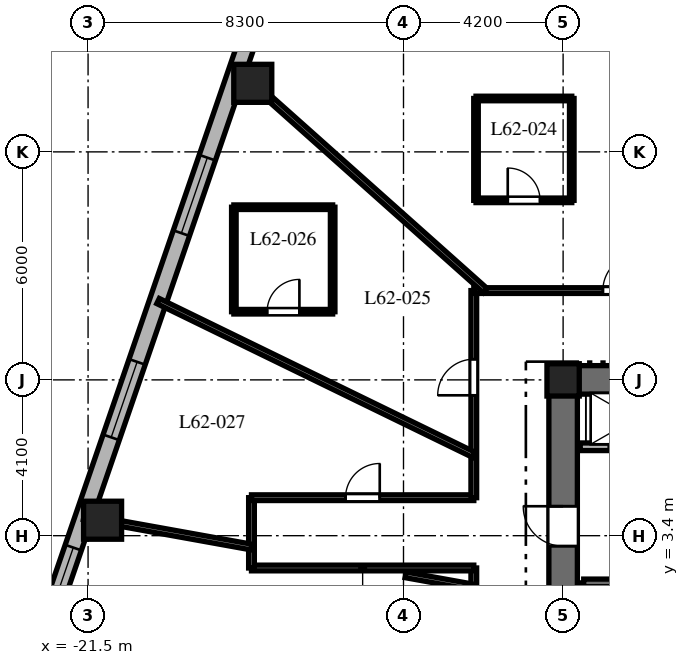
"""IFC4 building model, lengths in metres.
Left out: names, types, materials, properties, quantities, classifications, styles, units other than length and angle.
Written with IfcOpenShell. Run it as: python <this file> out.ifc"""

import sys

from ifc_helpers import new_model, si_unit, direction, frame, frame_2d, origin, origin_2d, place, context, subcontext, project, spatial, rectangle, extrude, element, fill, save


model = new_model("IFC4")
c1 = context("Model", 3, precision=1e-05, world=origin(), true_north=direction((0.0, 1.0)))
c2 = subcontext(c1, "Body", "Model", "MODEL_VIEW")
j1 = project(units=[si_unit("LENGTHUNIT", "METRE"), si_unit("PLANEANGLEUNIT", "RADIAN")], contexts=[c1])
p1 = place(None, origin())
s1 = spatial("IfcSite", under=j1, at=p1, CompositionType="ELEMENT")
p2 = place(p1, origin())
s2 = spatial("IfcBuilding", under=s1, at=p2, CompositionType="ELEMENT")
p3 = place(p2, frame((0.0, 0.0, 248.3)))
s3 = spatial("IfcBuildingStorey", under=s2, at=p3, CompositionType="ELEMENT", Elevation=248.3)
p4 = place(p3, frame((-9.375, 7.5, 0.0), z_axis=(0.0, 0.0, 1.0), x_axis=(1.0, 0.0, 0.0)))
e1 = element("IfcWall", 1, at=p4, inside=s3, PredefinedType="SHEAR", context=c2, shape_type="SweptSolid", body=[
    extrude(rectangle(XDim=9.425, YDim=0.75, at=frame_2d((4.712, 0.0))), origin(), (0.0, 0.0, 1.0), 3.8),
])
p5 = place(p3, frame((-9.0, -7.125, 0.0), z_axis=(0.0, 0.0, 1.0), x_axis=(0.0, 1.0, 0.0)))
e2 = element("IfcWall", 2, at=p5, inside=s3, PredefinedType="SHEAR", context=c2, shape_type="SweptSolid", body=[
    extrude(rectangle(XDim=14.25, YDim=0.75, at=frame_2d((7.125, 0.0))), origin(), (0.0, 0.0, 1.0), 3.8),
])
p6 = place(p5, frame((10.25, 0.0, 0.0)))
e3 = element("IfcOpeningElement", 3, at=p6, cuts=e2, PredefinedType="OPENING", context=c2, shape_type="SweptSolid", body=[
    extrude(rectangle(XDim=1.05, YDim=2.15, at=frame_2d((0.525, 1.075))), frame((0.0, 0.385, 0.0), z_axis=(0.0, -1.0, 0.0), x_axis=(1.0, 0.0, 0.0)), (0.0, 0.0, 1.0), 0.77),
])
p7 = place(p3, frame((-8.458, -6.985, 0.0), z_axis=(0.0, 0.0, 1.0), x_axis=(0.0, 1.0, 0.0)))
e4 = element("IfcWall", 4, at=p7, inside=s3, PredefinedType="SHEAR", context=c2, shape_type="SweptSolid", body=[
    extrude(rectangle(XDim=9.143, YDim=0.2, at=frame_2d((4.572, 0.0))), origin(), (0.0, 0.0, 1.0), 3.8),
])
p8 = place(p3, frame((-8.458, 2.158, 0.0), z_axis=(0.0, 0.0, 1.0), x_axis=(1.0, 0.0, 0.0)))
e5 = element("IfcWall", 5, at=p8, inside=s3, PredefinedType="SHEAR", context=c2, shape_type="SweptSolid", body=[
    extrude(rectangle(XDim=3.686, YDim=0.2, at=frame_2d((1.843, 0.0))), origin(), (0.0, 0.0, 1.0), 3.8),
])
p9 = place(p8, frame((1.3, 0.0, 0.0)))
e6 = element("IfcOpeningElement", 6, at=p9, cuts=e5, PredefinedType="OPENING", context=c2, shape_type="SweptSolid", body=[
    extrude(rectangle(XDim=1.0, YDim=2.15, at=frame_2d((0.5, 1.075))), frame((0.0, 0.11, 0.0), z_axis=(0.0, -1.0, 0.0), x_axis=(1.0, 0.0, 0.0)), (0.0, 0.0, 1.0), 0.22),
])
p10 = place(p3, frame((-9.0, 7.5, 0.0), z_axis=(0.0, 0.0, 1.0), x_axis=(1.0, 0.0, 0.0)))
e7 = element("IfcColumn", 7, at=p10, inside=s3, PredefinedType="COLUMN", context=c2, shape_type="SweptSolid", body=[
    extrude(rectangle(XDim=0.85, YDim=0.85, at=origin_2d()), origin(), (0.0, 0.0, 1.0), 3.8),
])
for number, where, z_axis, x_axis in (
    (8, (-17.166, 15.304, 0.0), (0.0, 0.0, 1.0), (1.0, 0.0, 0.0)),
    (9, (-21.118, 3.807, 0.0), (0.0, 0.0, 1.0), (1.0, 0.0, 0.0)),
):
    element("IfcColumn", number, at=place(p3, frame(where, z_axis=z_axis, x_axis=x_axis)), inside=s3, PredefinedType="COLUMN", context=c2, shape_type="SweptSolid", body=[
        extrude(rectangle(XDim=1.0, YDim=1.0, at=origin_2d()), origin(), (0.0, 0.0, 1.0), 3.8),
    ])
p11 = place(p3, frame((-16.324, 19.275, 0.0), z_axis=(0.0, 0.0, 1.0), x_axis=(-0.325083142304, -0.945685439557, 0.0)))
e10 = element("IfcWall", 10, at=p11, inside=s3, PredefinedType="SOLIDWALL", context=c2, shape_type="SweptSolid", body=[
    extrude(rectangle(XDim=20.224, YDim=0.45, at=frame_2d((10.112, 0.0))), origin(), (0.0, 0.0, 1.0), 3.5),
])
p12 = place(p11, frame((0.953, 0.0, 0.8)))
e11 = element("IfcOpeningElement", 11, at=p12, cuts=e10, PredefinedType="OPENING", context=c2, shape_type="SweptSolid", body=[
    extrude(rectangle(XDim=2.1, YDim=1.85, at=frame_2d((1.05, 0.925))), frame((0.0, 0.235, 0.0), z_axis=(0.0, -1.0, 0.0), x_axis=(1.0, 0.0, 0.0)), (0.0, 0.0, 1.0), 0.47),
])
p13 = place(p11, frame((6.268, 0.0, 0.8)))
e12 = element("IfcOpeningElement", 12, at=p13, cuts=e10, PredefinedType="OPENING", context=c2, shape_type="SweptSolid", body=[
    extrude(rectangle(XDim=2.1, YDim=1.85, at=frame_2d((1.05, 0.925))), frame((0.0, 0.235, 0.0), z_axis=(0.0, -1.0, 0.0), x_axis=(1.0, 0.0, 0.0)), (0.0, 0.0, 1.0), 0.47),
])
p14 = place(p11, frame((11.95, 0.0, 0.8)))
e13 = element("IfcOpeningElement", 13, at=p14, cuts=e10, PredefinedType="OPENING", context=c2, shape_type="SweptSolid", body=[
    extrude(rectangle(XDim=2.1, YDim=1.85, at=frame_2d((1.05, 0.925))), frame((0.0, 0.235, 0.0), z_axis=(0.0, -1.0, 0.0), x_axis=(1.0, 0.0, 0.0)), (0.0, 0.0, 1.0), 0.47),
])
p15 = place(p11, frame((17.118, 0.0, 0.8)))
e14 = element("IfcOpeningElement", 14, at=p15, cuts=e10, PredefinedType="OPENING", context=c2, shape_type="SweptSolid", body=[
    extrude(rectangle(XDim=2.1, YDim=1.85, at=frame_2d((1.05, 0.925))), frame((0.0, 0.235, 0.0), z_axis=(0.0, -1.0, 0.0), x_axis=(1.0, 0.0, 0.0)), (0.0, 0.0, 1.0), 0.47),
])
p16 = place(p3, frame((-8.55, 5.74, 0.0), z_axis=(0.0, 0.0, 1.0), x_axis=(1.0, 0.0, 0.0)))
e15 = element("IfcWall", 15, at=p16, inside=s3, PredefinedType="PARTITIONING", context=c2, shape_type="SweptSolid", body=[
    extrude(rectangle(XDim=4.05, YDim=0.2, at=frame_2d((2.025, 0.0))), origin(), (0.0, 0.0, 1.0), 3.5),
])
p17 = place(p16, frame((0.75, 0.0, 0.0)))
e16 = element("IfcOpeningElement", 16, at=p17, cuts=e15, PredefinedType="OPENING", context=c2, shape_type="SweptSolid", body=[
    extrude(rectangle(XDim=1.1, YDim=2.2, at=frame_2d((0.55, 1.1))), frame((0.0, 0.11, 0.0), z_axis=(0.0, -1.0, 0.0), x_axis=(1.0, 0.0, 0.0)), (0.0, 0.0, 1.0), 0.22),
])
p18 = place(p16, frame((2.9, 0.0, 0.0)))
e17 = element("IfcOpeningElement", 17, at=p18, cuts=e15, PredefinedType="OPENING", context=c2, shape_type="SweptSolid", body=[
    extrude(rectangle(XDim=0.85, YDim=2.03, at=frame_2d((0.425, 1.015))), frame((0.0, 0.11, 0.0), z_axis=(0.0, -1.0, 0.0), x_axis=(1.0, 0.0, 0.0)), (0.0, 0.0, 1.0), 0.22),
])
p19 = place(p3, frame((-11.35, -9.85, 0.0), z_axis=(0.0, 0.0, 1.0), x_axis=(0.0, 1.0, 0.0)))
e18 = element("IfcWall", 18, at=p19, inside=s3, PredefinedType="PARTITIONING", context=c2, shape_type="SweptSolid", body=[
    extrude(rectangle(XDim=12.4, YDim=0.15, at=frame_2d((6.2, 0.0))), origin(), (0.0, 0.0, 1.0), 2.99),
])
p20 = place(p19, frame((8.835, 0.0, 0.0)))
e19 = element("IfcOpeningElement", 19, at=p20, cuts=e18, PredefinedType="OPENING", context=c2, shape_type="SweptSolid", body=[
    extrude(rectangle(XDim=0.95, YDim=2.03, at=frame_2d((0.475, 1.015))), frame((0.0, 0.085, 0.0), z_axis=(0.0, -1.0, 0.0), x_axis=(1.0, 0.0, 0.0)), (0.0, 0.0, 1.0), 0.17),
])
p21 = place(p19, frame((4.709, 0.0, 0.0)))
e20 = element("IfcOpeningElement", 20, at=p21, cuts=e18, PredefinedType="OPENING", context=c2, shape_type="SweptSolid", body=[
    extrude(rectangle(XDim=0.9, YDim=2.03, at=frame_2d((0.45, 1.015))), frame((0.0, 0.085, 0.0), z_axis=(0.0, -1.0, 0.0), x_axis=(1.0, 0.0, 0.0)), (0.0, 0.0, 1.0), 0.17),
])
p22 = place(p19, frame((1.457, 0.0, 0.0)))
e21 = element("IfcOpeningElement", 21, at=p22, cuts=e18, PredefinedType="OPENING", context=c2, shape_type="SweptSolid", body=[
    extrude(rectangle(XDim=0.95, YDim=2.03, at=frame_2d((0.475, 1.015))), frame((0.0, 0.085, 0.0), z_axis=(0.0, -1.0, 0.0), x_axis=(1.0, 0.0, 0.0)), (0.0, 0.0, 1.0), 0.17),
])
p23 = place(p3, frame((-11.35, 2.55, 0.0), z_axis=(0.0, 0.0, 1.0), x_axis=(-1.0, 0.0, 0.0)))
e22 = element("IfcWall", 22, at=p23, inside=s3, PredefinedType="PARTITIONING", context=c2, shape_type="SweptSolid", body=[
    extrude(rectangle(XDim=5.85, YDim=0.15, at=frame_2d((2.925, 0.0))), origin(), (0.0, 0.0, 1.0), 2.94),
])
p24 = place(p3, frame((-17.2, 2.55, 0.0), z_axis=(0.0, 0.0, 1.0), x_axis=(0.0, 1.0, 0.0)))
e23 = element("IfcWall", 23, at=p24, inside=s3, PredefinedType="PARTITIONING", context=c2, shape_type="SweptSolid", body=[
    extrude(rectangle(XDim=1.85, YDim=0.15, at=frame_2d((0.925, 0.0))), origin(), (0.0, 0.0, 1.0), 2.94),
])
p25 = place(p3, frame((-17.2, 4.4, 0.0), z_axis=(0.0, 0.0, 1.0), x_axis=(1.0, 0.0, 0.0)))
e24 = element("IfcWall", 24, at=p25, inside=s3, PredefinedType="PARTITIONING", context=c2, shape_type="SweptSolid", body=[
    extrude(rectangle(XDim=5.85, YDim=0.15, at=frame_2d((2.925, 0.0))), origin(), (0.0, 0.0, 1.0), 2.94),
])
p26 = place(p25, frame((2.475, 0.0, 0.0)))
e25 = element("IfcOpeningElement", 25, at=p26, cuts=e24, PredefinedType="OPENING", context=c2, shape_type="SweptSolid", body=[
    extrude(rectangle(XDim=0.9, YDim=2.03, at=frame_2d((0.45, 1.015))), frame((0.0, 0.085, 0.0), z_axis=(0.0, -1.0, 0.0), x_axis=(1.0, 0.0, 0.0)), (0.0, 0.0, 1.0), 0.17),
])
p27 = place(p3, frame((-11.35, 4.4, 0.0), z_axis=(0.0, 0.0, 1.0), x_axis=(0.0, 1.0, 0.0)))
e26 = element("IfcWall", 26, at=p27, inside=s3, PredefinedType="PARTITIONING", context=c2, shape_type="SweptSolid", body=[
    extrude(rectangle(XDim=5.45, YDim=0.15, at=frame_2d((2.725, 0.0))), origin(), (0.0, 0.0, 1.0), 2.99),
])
p28 = place(p27, frame((2.694, 0.0, 0.0)))
e27 = element("IfcOpeningElement", 27, at=p28, cuts=e26, PredefinedType="OPENING", context=c2, shape_type="SweptSolid", body=[
    extrude(rectangle(XDim=0.95, YDim=2.03, at=frame_2d((0.475, 1.015))), frame((0.0, 0.085, 0.0), z_axis=(0.0, -1.0, 0.0), x_axis=(1.0, 0.0, 0.0)), (0.0, 0.0, 1.0), 0.17),
])
p29 = place(p3, frame((-11.35, 9.85, 0.0), z_axis=(0.0, 0.0, 1.0), x_axis=(1.0, 0.0, 0.0)))
e28 = element("IfcWall", 28, at=p29, inside=s3, PredefinedType="PARTITIONING", context=c2, shape_type="SweptSolid", body=[
    extrude(rectangle(XDim=10.43, YDim=0.15, at=frame_2d((5.215, 0.0))), origin(), (0.0, 0.0, 1.0), 2.99),
])
p30 = place(p29, frame((8.362, 0.0, 0.0)))
e29 = element("IfcOpeningElement", 29, at=p30, cuts=e28, PredefinedType="OPENING", context=c2, shape_type="SweptSolid", body=[
    extrude(rectangle(XDim=0.95, YDim=2.03, at=frame_2d((0.475, 1.015))), frame((0.0, 0.085, 0.0), z_axis=(0.0, -1.0, 0.0), x_axis=(1.0, 0.0, 0.0)), (0.0, 0.0, 1.0), 0.17),
])
p31 = place(p29, frame((3.396, 0.0, 0.0)))
e30 = element("IfcOpeningElement", 30, at=p31, cuts=e28, PredefinedType="OPENING", context=c2, shape_type="SweptSolid", body=[
    extrude(rectangle(XDim=0.95, YDim=2.03, at=frame_2d((0.475, 1.015))), frame((0.0, 0.085, 0.0), z_axis=(0.0, -1.0, 0.0), x_axis=(1.0, 0.0, 0.0)), (0.0, 0.0, 1.0), 0.17),
])
p32 = place(p3, frame((-3.848, 9.85, 0.0), z_axis=(0.0, 0.0, 1.0), x_axis=(-0.363921778212, 0.931429513889, 0.0)))
e31 = element("IfcWall", 31, at=p32, inside=s3, PredefinedType="PARTITIONING", context=c2, shape_type="SweptSolid", body=[
    extrude(rectangle(XDim=12.588, YDim=0.15, at=frame_2d((6.294, 0.0))), origin(), (0.0, 0.0, 1.0), 2.74),
])
p33 = place(p3, frame((-11.048, 9.85, 0.0), z_axis=(0.0, 0.0, 1.0), x_axis=(-0.746444434655, 0.665447748492, 0.0)))
e32 = element("IfcWall", 32, at=p33, inside=s3, PredefinedType="PARTITIONING", context=c2, shape_type="SweptSolid", body=[
    extrude(rectangle(XDim=8.732, YDim=0.15, at=frame_2d((4.366, 0.0))), origin(), (0.0, 0.0, 1.0), 2.74),
])
p34 = place(p3, frame((-11.35, 5.528, 0.0), z_axis=(0.0, 0.0, 1.0), x_axis=(-0.899038669565, 0.437869239188, 0.0)))
e33 = element("IfcWall", 33, at=p34, inside=s3, PredefinedType="PARTITIONING", context=c2, shape_type="SweptSolid", body=[
    extrude(rectangle(XDim=9.242, YDim=0.15, at=frame_2d((4.621, 0.0))), origin(), (0.0, 0.0, 1.0), 2.74),
])
p35 = place(p3, frame((-11.35, 2.046, 0.0), z_axis=(0.0, 0.0, 1.0), x_axis=(-0.984127783205, 0.177461281195, 0.0)))
e34 = element("IfcWall", 34, at=p35, inside=s3, PredefinedType="PARTITIONING", context=c2, shape_type="SweptSolid", body=[
    extrude(rectangle(XDim=1.826, YDim=0.15, at=frame_2d((0.913, 0.0))), origin(), (0.0, 0.0, 1.0), 3.5),
])
p36 = place(p3, frame((-17.2, 3.101, 0.0), z_axis=(0.0, 0.0, 1.0), x_axis=(-0.98413465883, 0.177423147559, 0.0)))
e35 = element("IfcWall", 35, at=p36, inside=s3, PredefinedType="PARTITIONING", context=c2, shape_type="SweptSolid", body=[
    extrude(rectangle(XDim=4.482, YDim=0.15, at=frame_2d((2.241, 0.0))), origin(), (0.0, 0.0, 1.0), 2.74),
])
p37 = place(p3, frame((-11.292, 12.225, 0.0), z_axis=(0.0, 0.0, 1.0), x_axis=(1.0, 0.0, 0.0)))
e36 = element("IfcWall", 36, at=p37, inside=s3, PredefinedType="PARTITIONING", context=c2, shape_type="SweptSolid", body=[
    extrude(rectangle(XDim=2.52, YDim=0.12, at=frame_2d((1.26, 0.0))), origin(), (0.0, 0.0, 1.0), 2.99),
])
p38 = place(p37, frame((0.835, 0.0, 0.0)))
e37 = element("IfcOpeningElement", 37, at=p38, cuts=e36, PredefinedType="OPENING", context=c2, shape_type="SweptSolid", body=[
    extrude(rectangle(XDim=0.85, YDim=2.03, at=frame_2d((0.425, 1.015))), frame((0.0, 0.07, 0.0), z_axis=(0.0, -1.0, 0.0), x_axis=(1.0, 0.0, 0.0)), (0.0, 0.0, 1.0), 0.14),
])
p39 = place(p3, frame((-8.772, 12.225, 0.0), z_axis=(0.0, 0.0, 1.0), x_axis=(0.0, 1.0, 0.0)))
e38 = element("IfcWall", 38, at=p39, inside=s3, PredefinedType="PARTITIONING", context=c2, shape_type="SweptSolid", body=[
    extrude(rectangle(XDim=2.68, YDim=0.12, at=frame_2d((1.34, 0.0))), origin(), (0.0, 0.0, 1.0), 2.99),
])
p40 = place(p3, frame((-8.772, 14.905, 0.0), z_axis=(0.0, 0.0, 1.0), x_axis=(-1.0, 0.0, 0.0)))
e39 = element("IfcWall", 39, at=p40, inside=s3, PredefinedType="PARTITIONING", context=c2, shape_type="SweptSolid", body=[
    extrude(rectangle(XDim=2.52, YDim=0.12, at=frame_2d((1.26, 0.0))), origin(), (0.0, 0.0, 1.0), 3.026),
])
p41 = place(p3, frame((-11.292, 14.905, 0.0), z_axis=(0.0, 0.0, 1.0), x_axis=(0.0, -1.0, 0.0)))
e40 = element("IfcWall", 40, at=p41, inside=s3, PredefinedType="PARTITIONING", context=c2, shape_type="SweptSolid", body=[
    extrude(rectangle(XDim=2.68, YDim=0.12, at=frame_2d((1.34, 0.0))), origin(), (0.0, 0.0, 1.0), 3.026),
])
p42 = place(p3, frame((-17.664, 9.294, 0.0), z_axis=(0.0, 0.0, 1.0), x_axis=(1.0, 0.0, 0.0)))
e41 = element("IfcWall", 41, at=p42, inside=s3, PredefinedType="PARTITIONING", context=c2, shape_type="SweptSolid", body=[
    extrude(rectangle(XDim=2.6, YDim=0.12, at=frame_2d((1.3, 0.0))), origin(), (0.0, 0.0, 1.0), 3.072),
])
p43 = place(p42, frame((0.875, 0.0, 0.0)))
e42 = element("IfcOpeningElement", 42, at=p43, cuts=e41, PredefinedType="OPENING", context=c2, shape_type="SweptSolid", body=[
    extrude(rectangle(XDim=0.85, YDim=2.03, at=frame_2d((0.425, 1.015))), frame((0.0, 0.07, 0.0), z_axis=(0.0, -1.0, 0.0), x_axis=(1.0, 0.0, 0.0)), (0.0, 0.0, 1.0), 0.14),
])
p44 = place(p3, frame((-15.064, 9.294, 0.0), z_axis=(0.0, 0.0, 1.0), x_axis=(0.0, 1.0, 0.0)))
e43 = element("IfcWall", 43, at=p44, inside=s3, PredefinedType="PARTITIONING", context=c2, shape_type="SweptSolid", body=[
    extrude(rectangle(XDim=2.75, YDim=0.12, at=frame_2d((1.375, 0.0))), origin(), (0.0, 0.0, 1.0), 3.072),
])
p45 = place(p3, frame((-15.064, 12.044, 0.0), z_axis=(0.0, 0.0, 1.0), x_axis=(-1.0, 0.0, 0.0)))
e44 = element("IfcWall", 44, at=p45, inside=s3, PredefinedType="PARTITIONING", context=c2, shape_type="SweptSolid", body=[
    extrude(rectangle(XDim=2.6, YDim=0.12, at=frame_2d((1.3, 0.0))), origin(), (0.0, 0.0, 1.0), 3.5),
])
p46 = place(p3, frame((-17.664, 12.044, 0.0), z_axis=(0.0, 0.0, 1.0), x_axis=(0.0, -1.0, 0.0)))
e45 = element("IfcWall", 45, at=p46, inside=s3, PredefinedType="PARTITIONING", context=c2, shape_type="SweptSolid", body=[
    extrude(rectangle(XDim=2.75, YDim=0.12, at=frame_2d((1.375, 0.0))), origin(), (0.0, 0.0, 1.0), 3.5),
])
p47 = place(p13, origin())
e46 = element("IfcWindow", 46, at=p47, inside=s3, PartitioningType="SINGLE_PANEL", PredefinedType="WINDOW", context=c2, shape_type="SweptSolid", body=[
    extrude(rectangle(XDim=2.1, YDim=1.85, at=frame_2d((1.05, 0.925))), frame((0.0, 0.03, 0.0), z_axis=(0.0, -1.0, 0.0), x_axis=(1.0, 0.0, 0.0)), (0.0, 0.0, 1.0), 0.06),
])
fill(e12, e46)
p48 = place(p14, origin())
e47 = element("IfcWindow", 47, at=p48, inside=s3, PartitioningType="SINGLE_PANEL", PredefinedType="WINDOW", context=c2, shape_type="SweptSolid", body=[
    extrude(rectangle(XDim=2.1, YDim=1.85, at=frame_2d((1.05, 0.925))), frame((0.0, 0.03, 0.0), z_axis=(0.0, -1.0, 0.0), x_axis=(1.0, 0.0, 0.0)), (0.0, 0.0, 1.0), 0.06),
])
fill(e13, e47)
p49 = place(p15, origin())
e48 = element("IfcWindow", 48, at=p49, inside=s3, PartitioningType="SINGLE_PANEL", PredefinedType="WINDOW", context=c2, shape_type="SweptSolid", body=[
    extrude(rectangle(XDim=2.1, YDim=1.85, at=frame_2d((1.05, 0.925))), frame((0.0, 0.03, 0.0), z_axis=(0.0, -1.0, 0.0), x_axis=(1.0, 0.0, 0.0)), (0.0, 0.0, 1.0), 0.06),
])
fill(e14, e48)
p50 = place(p6, origin())
e49 = element("IfcDoor", 49, at=p50, inside=s3, OperationType="SINGLE_SWING_RIGHT", PredefinedType="DOOR", context=c2, shape_type="SweptSolid", body=[
    extrude(rectangle(XDim=1.05, YDim=2.15, at=frame_2d((0.525, 1.075))), frame((0.0, 0.025, 0.0), z_axis=(0.0, -1.0, 0.0), x_axis=(1.0, 0.0, 0.0)), (0.0, 0.0, 1.0), 0.05),
])
fill(e3, e49)
p51 = place(p17, origin())
e50 = element("IfcDoor", 50, at=p51, inside=s3, OperationType="SLIDING_TO_LEFT", PredefinedType="DOOR", context=c2, shape_type="SweptSolid", body=[
    extrude(rectangle(XDim=1.1, YDim=2.2, at=frame_2d((0.55, 1.1))), frame((0.0, 0.025, 0.0), z_axis=(0.0, -1.0, 0.0), x_axis=(1.0, 0.0, 0.0)), (0.0, 0.0, 1.0), 0.05),
])
fill(e16, e50)
p52 = place(p31, origin())
e51 = element("IfcDoor", 51, at=p52, inside=s3, OperationType="SINGLE_SWING_RIGHT", PredefinedType="DOOR", context=c2, shape_type="SweptSolid", body=[
    extrude(rectangle(XDim=0.95, YDim=2.03, at=frame_2d((0.475, 1.015))), frame((0.0, 0.025, 0.0), z_axis=(0.0, -1.0, 0.0), x_axis=(1.0, 0.0, 0.0)), (0.0, 0.0, 1.0), 0.05),
])
fill(e30, e51)
p53 = place(p38, origin())
e52 = element("IfcDoor", 52, at=p53, inside=s3, OperationType="SINGLE_SWING_LEFT", PredefinedType="DOOR", context=c2, shape_type="SweptSolid", body=[
    extrude(rectangle(XDim=0.85, YDim=2.03, at=frame_2d((0.425, 1.015))), frame((0.0, 0.025, 0.0), z_axis=(0.0, -1.0, 0.0), x_axis=(1.0, 0.0, 0.0)), (0.0, 0.0, 1.0), 0.05),
])
fill(e37, e52)
p54 = place(p28, origin())
e53 = element("IfcDoor", 53, at=p54, inside=s3, OperationType="SINGLE_SWING_LEFT", PredefinedType="DOOR", context=c2, shape_type="SweptSolid", body=[
    extrude(rectangle(XDim=0.95, YDim=2.03, at=frame_2d((0.475, 1.015))), frame((0.0, 0.025, 0.0), z_axis=(0.0, -1.0, 0.0), x_axis=(1.0, 0.0, 0.0)), (0.0, 0.0, 1.0), 0.05),
])
fill(e27, e53)
p55 = place(p43, origin())
e54 = element("IfcDoor", 54, at=p55, inside=s3, OperationType="SINGLE_SWING_RIGHT", PredefinedType="DOOR", context=c2, shape_type="SweptSolid", body=[
    extrude(rectangle(XDim=0.85, YDim=2.03, at=frame_2d((0.425, 1.015))), frame((0.0, 0.025, 0.0), z_axis=(0.0, -1.0, 0.0), x_axis=(1.0, 0.0, 0.0)), (0.0, 0.0, 1.0), 0.05),
])
fill(e42, e54)
p56 = place(p26, origin())
e55 = element("IfcDoor", 55, at=p56, inside=s3, OperationType="SINGLE_SWING_RIGHT", PredefinedType="DOOR", context=c2, shape_type="SweptSolid", body=[
    extrude(rectangle(XDim=0.9, YDim=2.03, at=frame_2d((0.45, 1.015))), frame((0.0, 0.025, 0.0), z_axis=(0.0, -1.0, 0.0), x_axis=(1.0, 0.0, 0.0)), (0.0, 0.0, 1.0), 0.05),
])
fill(e25, e55)
save(model, sys.argv[1])
